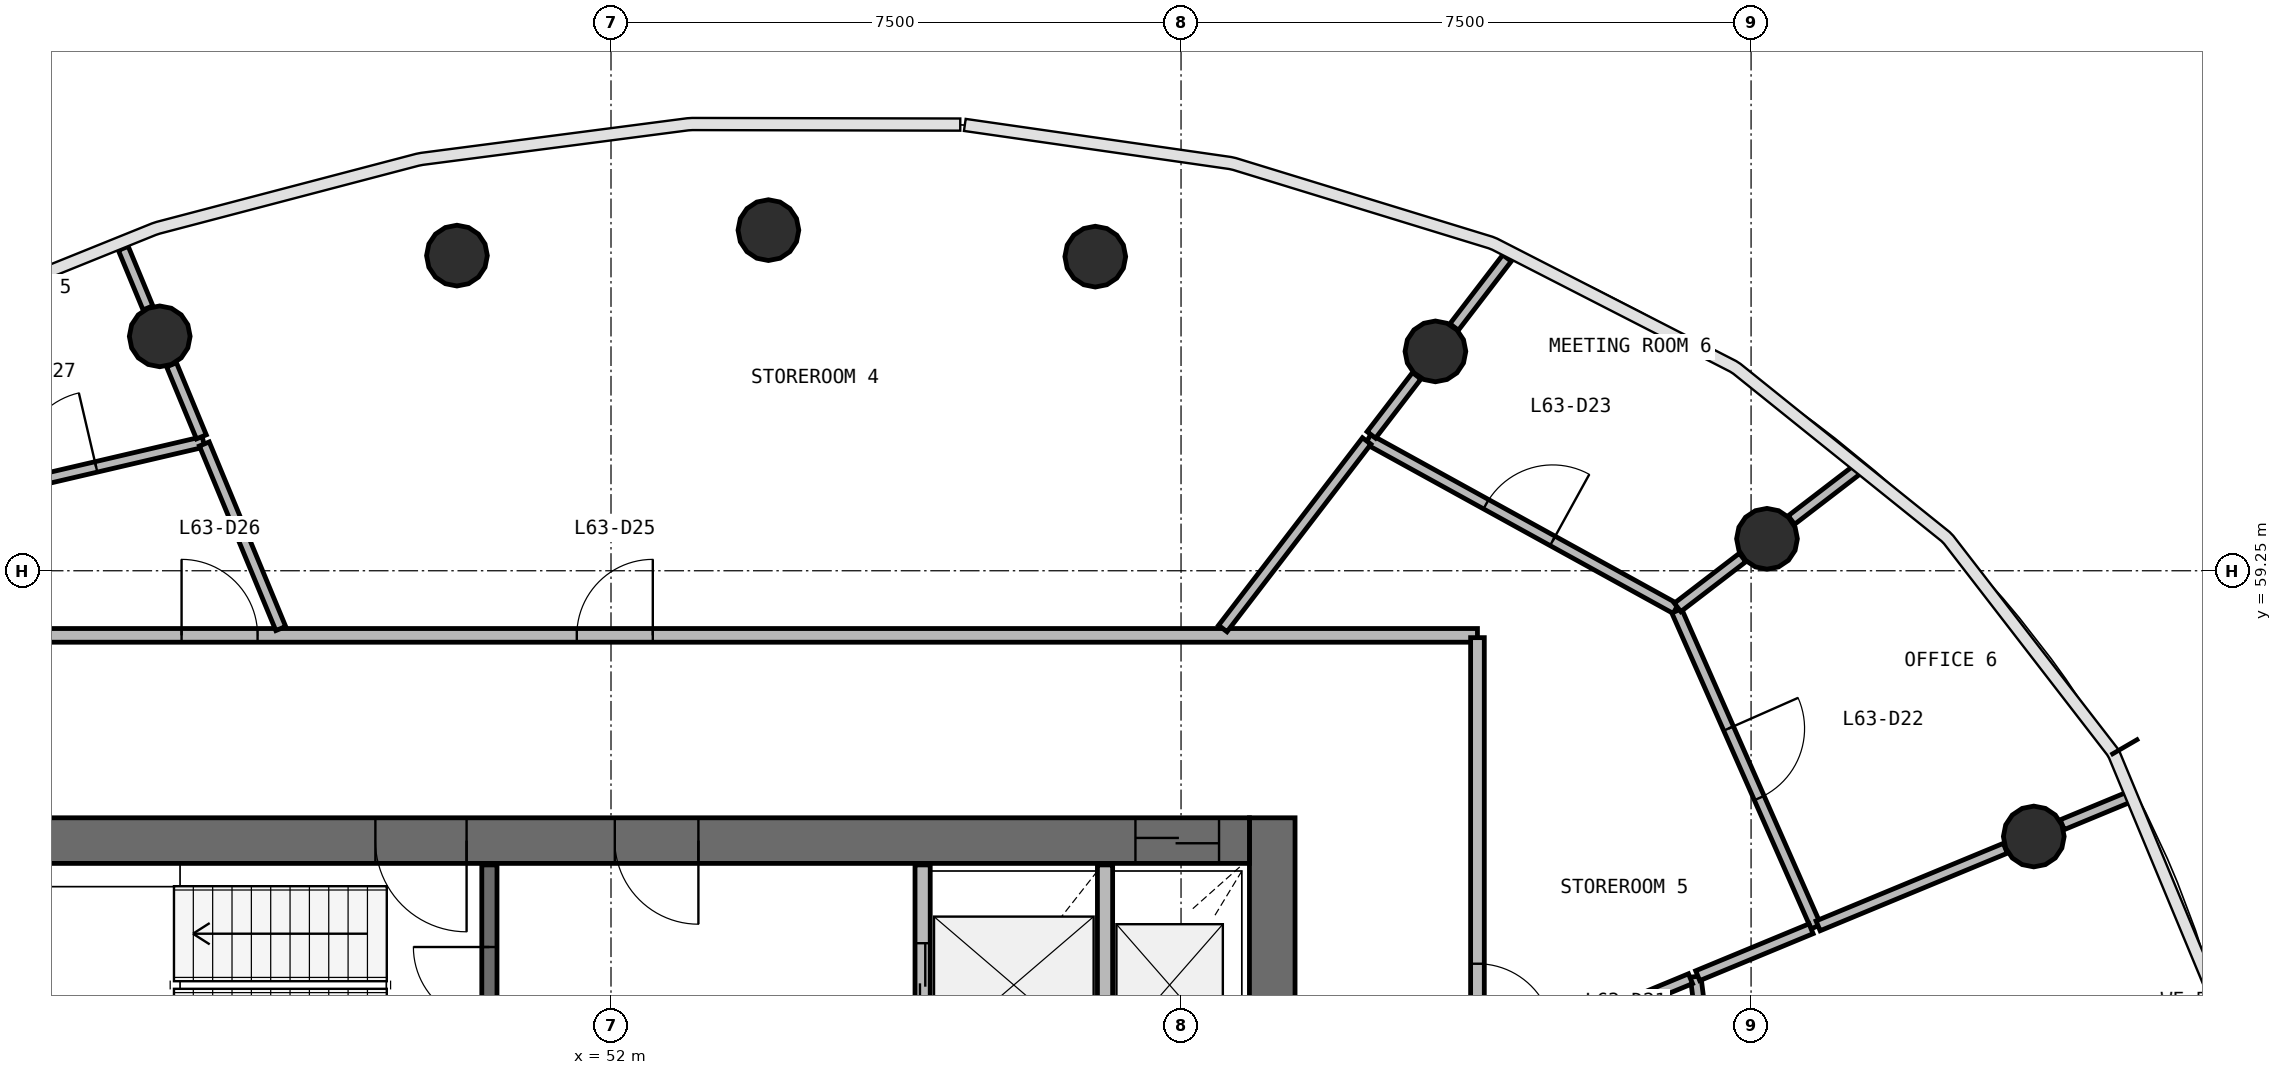
"""IFC4 building model, lengths in metres.
Left out: names, types, materials, properties, quantities, classifications, styles, units other than length and angle.
Written with IfcOpenShell. Run it as: python <this file> out.ifc"""

import sys

from ifc_helpers import new_model, si_unit, direction, frame, frame_2d, origin, origin_2d, place, context, subcontext, project, spatial, rectangle, circle, extrude, source, transform, mapped, element, fill, save


model = new_model("IFC4")
c1 = context("Model", 3, precision=1e-05, world=origin(), true_north=direction((0.0, 1.0)))
c2 = subcontext(c1, "Body", "Model", "MODEL_VIEW")
j1 = project(units=[si_unit("LENGTHUNIT", "METRE"), si_unit("PLANEANGLEUNIT", "RADIAN")], contexts=[c1])
p1 = place(None, origin())
s1 = spatial("IfcSite", under=j1, at=p1, CompositionType="ELEMENT")
p2 = place(p1, origin())
s2 = spatial("IfcBuilding", under=s1, at=p2, CompositionType="ELEMENT")
p3 = place(p2, frame((0.0, 0.0, 257.9)))
s3 = spatial("IfcBuildingStorey", under=s2, at=p3, CompositionType="ELEMENT", Elevation=257.9)
p4 = place(p3, frame((60.7, 40.0, 0.0), z_axis=(0.0, 0.0, 1.0), x_axis=(0.0, 1.0, 0.0)))
e1 = element("IfcWall", 1, at=p4, inside=s3, PredefinedType="SHEAR", context=c2, shape_type="SweptSolid", body=[
    extrude(rectangle(XDim=16.0, YDim=0.6, at=frame_2d((8.0, 0.0))), origin(), (0.0, 0.0, 1.0), 3.9),
])
p5 = place(p4, frame((7.1, 0.0, 0.0)))
e2 = element("IfcOpeningElement", 2, at=p5, cuts=e1, PredefinedType="OPENING", context=c2, shape_type="SweptSolid", body=[
    extrude(rectangle(XDim=1.8, YDim=2.1, at=frame_2d((0.9, 1.05))), frame((0.0, 0.31, 0.0), z_axis=(0.0, -1.0, 0.0), x_axis=(1.0, 0.0, 0.0)), (0.0, 0.0, 1.0), 0.62),
])
p6 = place(p3, frame((60.4, 55.7, 0.0), z_axis=(0.0, 0.0, 1.0), x_axis=(-1.0, 0.0, 0.0)))
e3 = element("IfcWall", 3, at=p6, inside=s3, PredefinedType="SHEAR", context=c2, shape_type="SweptSolid", body=[
    extrude(rectangle(XDim=16.8, YDim=0.6, at=frame_2d((8.4, 0.0))), origin(), (0.0, 0.0, 1.0), 3.9),
])
p7 = place(p6, frame((0.4, 0.0, 0.0)))
e4 = element("IfcOpeningElement", 4, at=p7, cuts=e3, PredefinedType="OPENING", context=c2, shape_type="SweptSolid", body=[
    extrude(rectangle(XDim=1.1, YDim=2.1, at=frame_2d((0.55, 1.05))), frame((0.0, 0.31, 0.0), z_axis=(0.0, -1.0, 0.0), x_axis=(1.0, 0.0, 0.0)), (0.0, 0.0, 1.0), 0.62),
])
p8 = place(p6, frame((10.3, 0.0, 0.0)))
e5 = element("IfcOpeningElement", 5, at=p8, cuts=e3, PredefinedType="OPENING", context=c2, shape_type="SweptSolid", body=[
    extrude(rectangle(XDim=1.2, YDim=2.1, at=frame_2d((0.6, 1.05))), frame((0.0, 0.31, 0.0), z_axis=(0.0, -1.0, 0.0), x_axis=(1.0, 0.0, 0.0)), (0.0, 0.0, 1.0), 0.62),
])
p9 = place(p6, frame((7.25, 0.0, 0.0)))
e6 = element("IfcOpeningElement", 6, at=p9, cuts=e3, PredefinedType="OPENING", context=c2, shape_type="SweptSolid", body=[
    extrude(rectangle(XDim=1.1, YDim=2.1, at=frame_2d((0.55, 1.05))), frame((0.0, 0.31, 0.0), z_axis=(0.0, -1.0, 0.0), x_axis=(1.0, 0.0, 0.0)), (0.0, 0.0, 1.0), 0.62),
])
m1 = source(origin(), c2, "Body", "SweptSolid", [
    extrude(circle(Radius=0.4, at=origin_2d()), origin(), (0.0, 0.0, 1.0), 3.9),
])
for number, where, z_axis, x_axis in (
    (7, (70.719, 55.754, 0.0), (0.0, 0.0, 1.0), (1.0, 0.0, 0.0)),
    (8, (67.209, 59.671, 0.0), (0.0, 0.0, 1.0), (1.0, 0.0, 0.0)),
    (9, (62.847, 62.136, 0.0), (0.0, 0.0, 1.0), (1.0, 0.0, 0.0)),
    (10, (58.372, 63.383, 0.0), (0.0, 0.0, 1.0), (1.0, 0.0, 0.0)),
    (11, (54.071, 63.731, 0.0), (0.0, 0.0, 1.0), (1.0, 0.0, 0.0)),
    (12, (49.973, 63.396, 0.0), (0.0, 0.0, 1.0), (1.0, 0.0, 0.0)),
    (13, (46.063, 62.334, 0.0), (0.0, 0.0, 1.0), (1.0, 0.0, 0.0)),
):
    element("IfcColumn", number, at=place(p3, frame(where, z_axis=z_axis, x_axis=x_axis)), inside=s3, PredefinedType="COLUMN", context=c2, shape_type="MappedRepresentation", body=[
        mapped(m1, transform((0.0, 0.0, 0.0), scale=1.0)),
    ])
p10 = place(p3, frame((50.4, 52.43, 0.0), z_axis=(0.0, 0.0, 1.0), x_axis=(0.0, 1.0, 0.0)))
e14 = element("IfcWall", 14, at=p10, inside=s3, PredefinedType="SOLIDWALL", context=c2, shape_type="SweptSolid", body=[
    extrude(rectangle(XDim=2.95, YDim=0.2, at=frame_2d((1.475, 0.0))), origin(), (0.0, 0.0, 1.0), 3.58),
])
p11 = place(p10, frame((0.87, 0.0, 0.0)))
e15 = element("IfcOpeningElement", 15, at=p11, cuts=e14, PredefinedType="OPENING", context=c2, shape_type="SweptSolid", body=[
    extrude(rectangle(XDim=1.0, YDim=2.1, at=frame_2d((0.5, 1.05))), frame((0.0, 0.11, 0.0), z_axis=(0.0, -1.0, 0.0), x_axis=(1.0, 0.0, 0.0)), (0.0, 0.0, 1.0), 0.22),
])
p12 = place(p3, frame((56.1, 55.38, 0.0), z_axis=(0.0, 0.0, 1.0), x_axis=(0.0, -1.0, 0.0)))
e16 = element("IfcWall", 16, at=p12, inside=s3, PredefinedType="SOLIDWALL", context=c2, shape_type="SweptSolid", body=[
    extrude(rectangle(XDim=2.98, YDim=0.2, at=frame_2d((1.49, 0.0))), origin(), (0.0, 0.0, 1.0), 3.58),
])
p13 = place(p12, frame((1.03, 0.0, 0.0)))
e17 = element("IfcOpeningElement", 17, at=p13, cuts=e16, PredefinedType="OPENING", context=c2, shape_type="SweptSolid", body=[
    extrude(rectangle(XDim=1.1, YDim=2.1, at=frame_2d((0.55, 1.05))), frame((0.0, 0.11, 0.0), z_axis=(0.0, -1.0, 0.0), x_axis=(1.0, 0.0, 0.0)), (0.0, 0.0, 1.0), 0.22),
])
p14 = place(p3, frame((58.5, 52.4, 0.0), z_axis=(0.0, 0.0, 1.0), x_axis=(0.0, 1.0, 0.0)))
e18 = element("IfcWall", 18, at=p14, inside=s3, PredefinedType="SOLIDWALL", context=c2, shape_type="SweptSolid", body=[
    extrude(rectangle(XDim=2.98, YDim=0.2, at=frame_2d((1.49, 0.0))), origin(), (0.0, 0.0, 1.0), 3.58),
])
p15 = place(p3, frame((40.6, 58.4, 0.0), z_axis=(0.0, 0.0, 1.0), x_axis=(1.0, 0.0, 0.0)))
e19 = element("IfcWall", 19, at=p15, inside=s3, PredefinedType="PARTITIONING", context=c2, shape_type="SweptSolid", body=[
    extrude(rectangle(XDim=22.8, YDim=0.18, at=frame_2d((11.4, 0.0))), origin(), (0.0, 0.0, 1.0), 2.88),
])
p16 = place(p15, frame((10.95, 0.0, 0.0)))
e20 = element("IfcOpeningElement", 20, at=p16, cuts=e19, PredefinedType="OPENING", context=c2, shape_type="SweptSolid", body=[
    extrude(rectangle(XDim=1.0, YDim=2.1, at=frame_2d((0.5, 1.05))), frame((0.0, 0.1, 0.0), z_axis=(0.0, -1.0, 0.0), x_axis=(1.0, 0.0, 0.0)), (0.0, 0.0, 1.0), 0.2),
])
p17 = place(p15, frame((5.75, 0.0, 0.0)))
e21 = element("IfcOpeningElement", 21, at=p17, cuts=e19, PredefinedType="OPENING", context=c2, shape_type="SweptSolid", body=[
    extrude(rectangle(XDim=1.0, YDim=2.1, at=frame_2d((0.5, 1.05))), frame((0.0, 0.1, 0.0), z_axis=(0.0, -1.0, 0.0), x_axis=(1.0, 0.0, 0.0)), (0.0, 0.0, 1.0), 0.2),
])
p18 = place(p3, frame((63.4, 58.37, 0.0), z_axis=(0.0, 0.0, 1.0), x_axis=(0.0, -1.0, 0.0)))
e22 = element("IfcWall", 22, at=p18, inside=s3, PredefinedType="PARTITIONING", context=c2, shape_type="SweptSolid", body=[
    extrude(rectangle(XDim=20.74, YDim=0.18, at=frame_2d((10.37, 0.0))), origin(), (0.0, 0.0, 1.0), 2.88),
])
p19 = place(p18, frame((9.99, 0.0, 0.0)))
e23 = element("IfcOpeningElement", 23, at=p19, cuts=e22, PredefinedType="OPENING", context=c2, shape_type="SweptSolid", body=[
    extrude(rectangle(XDim=0.9, YDim=2.1, at=frame_2d((0.45, 1.05))), frame((0.0, 0.1, 0.0), z_axis=(0.0, -1.0, 0.0), x_axis=(1.0, 0.0, 0.0)), (0.0, 0.0, 1.0), 0.2),
])
p20 = place(p18, frame((7.79, 0.0, 0.0)))
e24 = element("IfcOpeningElement", 24, at=p20, cuts=e22, PredefinedType="OPENING", context=c2, shape_type="SweptSolid", body=[
    extrude(rectangle(XDim=0.9, YDim=2.1, at=frame_2d((0.45, 1.05))), frame((0.0, 0.1, 0.0), z_axis=(0.0, -1.0, 0.0), x_axis=(1.0, 0.0, 0.0)), (0.0, 0.0, 1.0), 0.2),
])
p21 = place(p18, frame((4.29, 0.0, 0.0)))
e25 = element("IfcOpeningElement", 25, at=p21, cuts=e22, PredefinedType="OPENING", context=c2, shape_type="SweptSolid", body=[
    extrude(rectangle(XDim=1.0, YDim=2.1, at=frame_2d((0.5, 1.05))), frame((0.0, 0.1, 0.0), z_axis=(0.0, -1.0, 0.0), x_axis=(1.0, 0.0, 0.0)), (0.0, 0.0, 1.0), 0.2),
])
p22 = place(p18, frame((15.49, 0.0, 0.0)))
e26 = element("IfcOpeningElement", 26, at=p22, cuts=e22, PredefinedType="OPENING", context=c2, shape_type="SweptSolid", body=[
    extrude(rectangle(XDim=1.0, YDim=2.1, at=frame_2d((0.5, 1.05))), frame((0.0, 0.1, 0.0), z_axis=(0.0, -1.0, 0.0), x_axis=(1.0, 0.0, 0.0)), (0.0, 0.0, 1.0), 0.2),
])
p23 = place(p18, frame((12.09, 0.0, 0.0)))
e27 = element("IfcOpeningElement", 27, at=p23, cuts=e22, PredefinedType="OPENING", context=c2, shape_type="SweptSolid", body=[
    extrude(rectangle(XDim=1.0, YDim=2.1, at=frame_2d((0.5, 1.05))), frame((0.0, 0.1, 0.0), z_axis=(0.0, -1.0, 0.0), x_axis=(1.0, 0.0, 0.0)), (0.0, 0.0, 1.0), 0.2),
])
p24 = place(p3, frame((61.961, 60.981, 0.0), z_axis=(0.0, 0.0, 1.0), x_axis=(0.875806364123, -0.482662628096, 0.0)))
e28 = element("IfcWall", 28, at=p24, inside=s3, PredefinedType="PARTITIONING", context=c2, shape_type="SweptSolid", body=[
    extrude(rectangle(XDim=4.623, YDim=0.14, at=frame_2d((2.312, 0.0))), origin(), (0.0, 0.0, 1.0), 2.88),
])
p25 = place(p24, frame((1.773, 0.0, 0.0)))
e29 = element("IfcOpeningElement", 29, at=p25, cuts=e28, PredefinedType="OPENING", context=c2, shape_type="SweptSolid", body=[
    extrude(rectangle(XDim=1.0, YDim=2.1, at=frame_2d((0.5, 1.05))), frame((0.0, 0.08, 0.0), z_axis=(0.0, -1.0, 0.0), x_axis=(1.0, 0.0, 0.0)), (0.0, 0.0, 1.0), 0.16),
])
p26 = place(p3, frame((66.021, 58.722, 0.0), z_axis=(0.0, 0.0, 1.0), x_axis=(0.403558147764, -0.914953999594, 0.0)))
e30 = element("IfcWall", 30, at=p26, inside=s3, PredefinedType="PARTITIONING", context=c2, shape_type="SweptSolid", body=[
    extrude(rectangle(XDim=4.542, YDim=0.14, at=frame_2d((2.271, 0.0))), origin(), (0.0, 0.0, 1.0), 2.88),
])
p27 = place(p26, frame((1.691, 0.0, 0.0)))
e31 = element("IfcOpeningElement", 31, at=p27, cuts=e30, PredefinedType="OPENING", context=c2, shape_type="SweptSolid", body=[
    extrude(rectangle(XDim=1.0, YDim=2.1, at=frame_2d((0.5, 1.05))), frame((0.0, 0.08, 0.0), z_axis=(0.0, -1.0, 0.0), x_axis=(1.0, 0.0, 0.0)), (0.0, 0.0, 1.0), 0.16),
])
p28 = place(p3, frame((66.766, 49.944, 0.0), z_axis=(0.0, 0.0, 1.0), x_axis=(-0.124094865126, 0.992270358546, 0.0)))
e32 = element("IfcWall", 32, at=p28, inside=s3, PredefinedType="PARTITIONING", context=c2, shape_type="SweptSolid", body=[
    extrude(rectangle(XDim=3.998, YDim=0.14, at=frame_2d((1.999, 0.0))), origin(), (0.0, 0.0, 1.0), 2.88),
])
p29 = place(p3, frame((42.761, 60.04, 0.0), z_axis=(0.0, 0.0, 1.0), x_axis=(0.973788258545, 0.227456429935, 0.0)))
e33 = element("IfcWall", 33, at=p29, inside=s3, PredefinedType="PARTITIONING", context=c2, shape_type="SweptSolid", body=[
    extrude(rectangle(XDim=3.981, YDim=0.14, at=frame_2d((1.99, 0.0))), origin(), (0.0, 0.0, 1.0), 2.88),
])
p30 = place(p29, frame((1.531, 0.0, 0.0)))
e34 = element("IfcOpeningElement", 34, at=p30, cuts=e33, PredefinedType="OPENING", context=c2, shape_type="SweptSolid", body=[
    extrude(rectangle(XDim=1.0, YDim=2.1, at=frame_2d((0.5, 1.05))), frame((0.0, 0.08, 0.0), z_axis=(0.0, -1.0, 0.0), x_axis=(1.0, 0.0, 0.0)), (0.0, 0.0, 1.0), 0.16),
])
p31 = place(p3, frame((60.049, 58.49, 0.0), z_axis=(0.0, 0.0, 1.0), x_axis=(0.608731458137, 0.79337633685, 0.0)))
e35 = element("IfcWall", 35, at=p31, inside=s3, PredefinedType="PARTITIONING", context=c2, shape_type="SweptSolid", body=[
    extrude(rectangle(XDim=3.11, YDim=0.14, at=frame_2d((1.555, 0.0))), origin(), (0.0, 0.0, 1.0), 2.88),
])
p32 = place(p3, frame((63.49, 52.759, 0.0), z_axis=(0.0, 0.0, 1.0), x_axis=(0.923884097698, 0.382672410844, 0.0)))
e36 = element("IfcWall", 36, at=p32, inside=s3, PredefinedType="PARTITIONING", context=c2, shape_type="SweptSolid", body=[
    extrude(rectangle(XDim=2.937, YDim=0.14, at=frame_2d((1.468, 0.0))), origin(), (0.0, 0.0, 1.0), 2.88),
])
p33 = place(p3, frame((47.655, 58.49, 0.0), z_axis=(0.0, 0.0, 1.0), x_axis=(-0.382622530828, 0.923904756402, 0.0)))
e37 = element("IfcWall", 37, at=p33, inside=s3, PredefinedType="PARTITIONING", context=c2, shape_type="SweptSolid", body=[
    extrude(rectangle(XDim=2.628, YDim=0.14, at=frame_2d((1.314, 0.0))), origin(), (0.0, 0.0, 1.0), 2.88),
])
p34 = place(p3, frame((67.882, 54.579, 0.0), z_axis=(0.0, 0.0, 1.0), x_axis=(0.923906367218, 0.382618641225, 0.0)))
e38 = element("IfcWall", 38, at=p34, inside=s3, PredefinedType="PARTITIONING", context=c2, shape_type="SweptSolid", body=[
    extrude(rectangle(XDim=2.667, YDim=0.14, at=frame_2d((1.333, 0.0))), origin(), (0.0, 0.0, 1.0), 2.88),
])
p35 = place(p3, frame((66.298, 53.922, 0.0), z_axis=(0.0, 0.0, 1.0), x_axis=(0.923849088281, 0.382756922972, 0.0)))
e39 = element("IfcWall", 39, at=p35, inside=s3, PredefinedType="PARTITIONING", context=c2, shape_type="SweptSolid", body=[
    extrude(rectangle(XDim=1.615, YDim=0.14, at=frame_2d((0.807, 0.0))), origin(), (0.0, 0.0, 1.0), 2.88),
])
p36 = place(p3, frame((63.093, 62.457, 0.0), z_axis=(0.0, 0.0, 1.0), x_axis=(0.60864680101, 0.793441284293, 0.0)))
e40 = element("IfcWall", 40, at=p36, inside=s3, PredefinedType="PARTITIONING", context=c2, shape_type="SweptSolid", body=[
    extrude(rectangle(XDim=1.143, YDim=0.14, at=frame_2d((0.571, 0.0))), origin(), (0.0, 0.0, 1.0), 2.88),
])
p37 = place(p3, frame((67.531, 59.917, 0.0), z_axis=(0.0, 0.0, 1.0), x_axis=(0.793297066138, 0.608834759895, 0.0)))
e41 = element("IfcWall", 41, at=p37, inside=s3, PredefinedType="PARTITIONING", context=c2, shape_type="SweptSolid", body=[
    extrude(rectangle(XDim=1.118, YDim=0.14, at=frame_2d((0.559, 0.0))), origin(), (0.0, 0.0, 1.0), 2.88),
])
p38 = place(p3, frame((66.033, 58.768, 0.0), z_axis=(0.0, 0.0, 1.0), x_axis=(0.793322040953, 0.60880221693, 0.0)))
e42 = element("IfcWall", 42, at=p38, inside=s3, PredefinedType="PARTITIONING", context=c2, shape_type="SweptSolid", body=[
    extrude(rectangle(XDim=1.078, YDim=0.14, at=frame_2d((0.539, 0.0))), origin(), (0.0, 0.0, 1.0), 2.88),
])
p39 = place(p3, frame((46.611, 61.011, 0.0), z_axis=(0.0, 0.0, 1.0), x_axis=(-0.382722926072, 0.923863172693, 0.0)))
e43 = element("IfcWall", 43, at=p39, inside=s3, PredefinedType="PARTITIONING", context=c2, shape_type="SweptSolid", body=[
    extrude(rectangle(XDim=1.026, YDim=0.14, at=frame_2d((0.513, 0.0))), origin(), (0.0, 0.0, 1.0), 2.88),
])
p40 = place(p3, frame((62.004, 61.037, 0.0), z_axis=(0.0, 0.0, 1.0), x_axis=(0.608651106813, 0.793437981304, 0.0)))
e44 = element("IfcWall", 44, at=p40, inside=s3, PredefinedType="PARTITIONING", context=c2, shape_type="SweptSolid", body=[
    extrude(rectangle(XDim=0.98, YDim=0.14, at=frame_2d((0.49, 0.0))), origin(), (0.0, 0.0, 1.0), 2.88),
])
p41 = place(p3, frame((71.094, 55.909, 0.0), z_axis=(0.0, 0.0, 1.0), x_axis=(0.923893859205, 0.382648842835, 0.0)))
e45 = element("IfcWall", 45, at=p41, inside=s3, PredefinedType="PARTITIONING", context=c2, shape_type="SweptSolid", body=[
    extrude(rectangle(XDim=0.944, YDim=0.14, at=frame_2d((0.472, 0.0))), origin(), (0.0, 0.0, 1.0), 2.88),
])
p42 = place(p3, frame((45.908, 62.708, 0.0), z_axis=(0.0, 0.0, 1.0), x_axis=(-0.382877217127, 0.923799240422, 0.0)))
e46 = element("IfcWall", 46, at=p42, inside=s3, PredefinedType="PARTITIONING", context=c2, shape_type="SweptSolid", body=[
    extrude(rectangle(XDim=0.848, YDim=0.14, at=frame_2d((0.424, 0.0))), origin(), (0.0, 0.0, 1.0), 2.88),
])
m2 = source(origin(), c2, "Body", "SweptSolid", [
    extrude(rectangle(XDim=1.1, YDim=2.1, at=frame_2d((0.55, 1.05))), frame((0.0, 0.025, 0.0), z_axis=(0.0, -1.0, 0.0), x_axis=(1.0, 0.0, 0.0)), (0.0, 0.0, 1.0), 0.05),
])
p43 = place(p13, origin())
e47 = element("IfcDoor", 47, at=p43, inside=s3, OperationType="DOUBLE_DOOR_SLIDING", PredefinedType="USERDEFINED", context=c2, shape_type="MappedRepresentation", body=[
    mapped(m2, transform((0.0, 0.0, 0.0), scale=1.0)),
])
fill(e17, e47)
p44 = place(p7, origin())
e48 = element("IfcDoor", 48, at=p44, inside=s3, OperationType="DOUBLE_DOOR_SLIDING", PredefinedType="USERDEFINED", context=c2, shape_type="MappedRepresentation", body=[
    mapped(m2, transform((0.0, 0.0, 0.0), scale=1.0)),
])
fill(e4, e48)
m3 = source(origin(), c2, "Body", "SweptSolid", [
    extrude(rectangle(XDim=1.2, YDim=2.1, at=frame_2d((0.6, 1.05))), frame((0.0, 0.025, 0.0), z_axis=(0.0, -1.0, 0.0), x_axis=(1.0, 0.0, 0.0)), (0.0, 0.0, 1.0), 0.05),
])
p45 = place(p8, origin())
e49 = element("IfcDoor", 49, at=p45, inside=s3, OperationType="SINGLE_SWING_LEFT", PredefinedType="DOOR", context=c2, shape_type="MappedRepresentation", body=[
    mapped(m3, transform((0.0, 0.0, 0.0), scale=1.0)),
])
fill(e5, e49)
m4 = source(origin(), c2, "Body", "SweptSolid", [
    extrude(rectangle(XDim=1.0, YDim=2.1, at=frame_2d((0.5, 1.05))), frame((0.0, 0.025, 0.0), z_axis=(0.0, -1.0, 0.0), x_axis=(1.0, 0.0, 0.0)), (0.0, 0.0, 1.0), 0.05),
])
p46 = place(p11, origin())
e50 = element("IfcDoor", 50, at=p46, inside=s3, OperationType="SINGLE_SWING_RIGHT", PredefinedType="DOOR", context=c2, shape_type="MappedRepresentation", body=[
    mapped(m4, transform((0.0, 0.0, 0.0), scale=1.0)),
])
fill(e15, e50)
m5 = source(origin(), c2, "Body", "SweptSolid", [
    extrude(rectangle(XDim=1.1, YDim=2.1, at=frame_2d((0.55, 1.05))), frame((0.0, 0.025, 0.0), z_axis=(0.0, -1.0, 0.0), x_axis=(1.0, 0.0, 0.0)), (0.0, 0.0, 1.0), 0.05),
])
p47 = place(p9, origin())
e51 = element("IfcDoor", 51, at=p47, inside=s3, OperationType="SINGLE_SWING_LEFT", PredefinedType="DOOR", context=c2, shape_type="MappedRepresentation", body=[
    mapped(m5, transform((0.0, 0.0, 0.0), scale=1.0)),
])
fill(e6, e51)
m6 = source(origin(), c2, "Body", "SweptSolid", [
    extrude(rectangle(XDim=1.0, YDim=2.1, at=frame_2d((0.5, 1.05))), frame((0.0, 0.025, 0.0), z_axis=(0.0, -1.0, 0.0), x_axis=(1.0, 0.0, 0.0)), (0.0, 0.0, 1.0), 0.05),
])
p48 = place(p21, origin())
e52 = element("IfcDoor", 52, at=p48, inside=s3, OperationType="SINGLE_SWING_RIGHT", PredefinedType="DOOR", context=c2, shape_type="MappedRepresentation", body=[
    mapped(m6, transform((0.0, 0.0, 0.0), scale=1.0)),
])
fill(e25, e52)
p49 = place(p27, origin())
e53 = element("IfcDoor", 53, at=p49, inside=s3, OperationType="SINGLE_SWING_LEFT", PredefinedType="DOOR", context=c2, shape_type="MappedRepresentation", body=[
    mapped(m6, transform((0.0, 0.0, 0.0), scale=1.0)),
])
fill(e31, e53)
p50 = place(p25, origin())
e54 = element("IfcDoor", 54, at=p50, inside=s3, OperationType="SINGLE_SWING_RIGHT", PredefinedType="DOOR", context=c2, shape_type="MappedRepresentation", body=[
    mapped(m6, transform((0.0, 0.0, 0.0), scale=1.0)),
])
fill(e29, e54)
p51 = place(p16, origin())
e55 = element("IfcDoor", 55, at=p51, inside=s3, OperationType="SINGLE_SWING_RIGHT", PredefinedType="DOOR", context=c2, shape_type="MappedRepresentation", body=[
    mapped(m6, transform((0.0, 0.0, 0.0), scale=1.0)),
])
fill(e20, e55)
p52 = place(p17, origin())
e56 = element("IfcDoor", 56, at=p52, inside=s3, OperationType="SINGLE_SWING_LEFT", PredefinedType="DOOR", context=c2, shape_type="MappedRepresentation", body=[
    mapped(m6, transform((0.0, 0.0, 0.0), scale=1.0)),
])
fill(e21, e56)
p53 = place(p30, origin())
e57 = element("IfcDoor", 57, at=p53, inside=s3, OperationType="SINGLE_SWING_RIGHT", PredefinedType="DOOR", context=c2, shape_type="MappedRepresentation", body=[
    mapped(m6, transform((0.0, 0.0, 0.0), scale=1.0)),
])
fill(e34, e57)
save(model, sys.argv[1])
